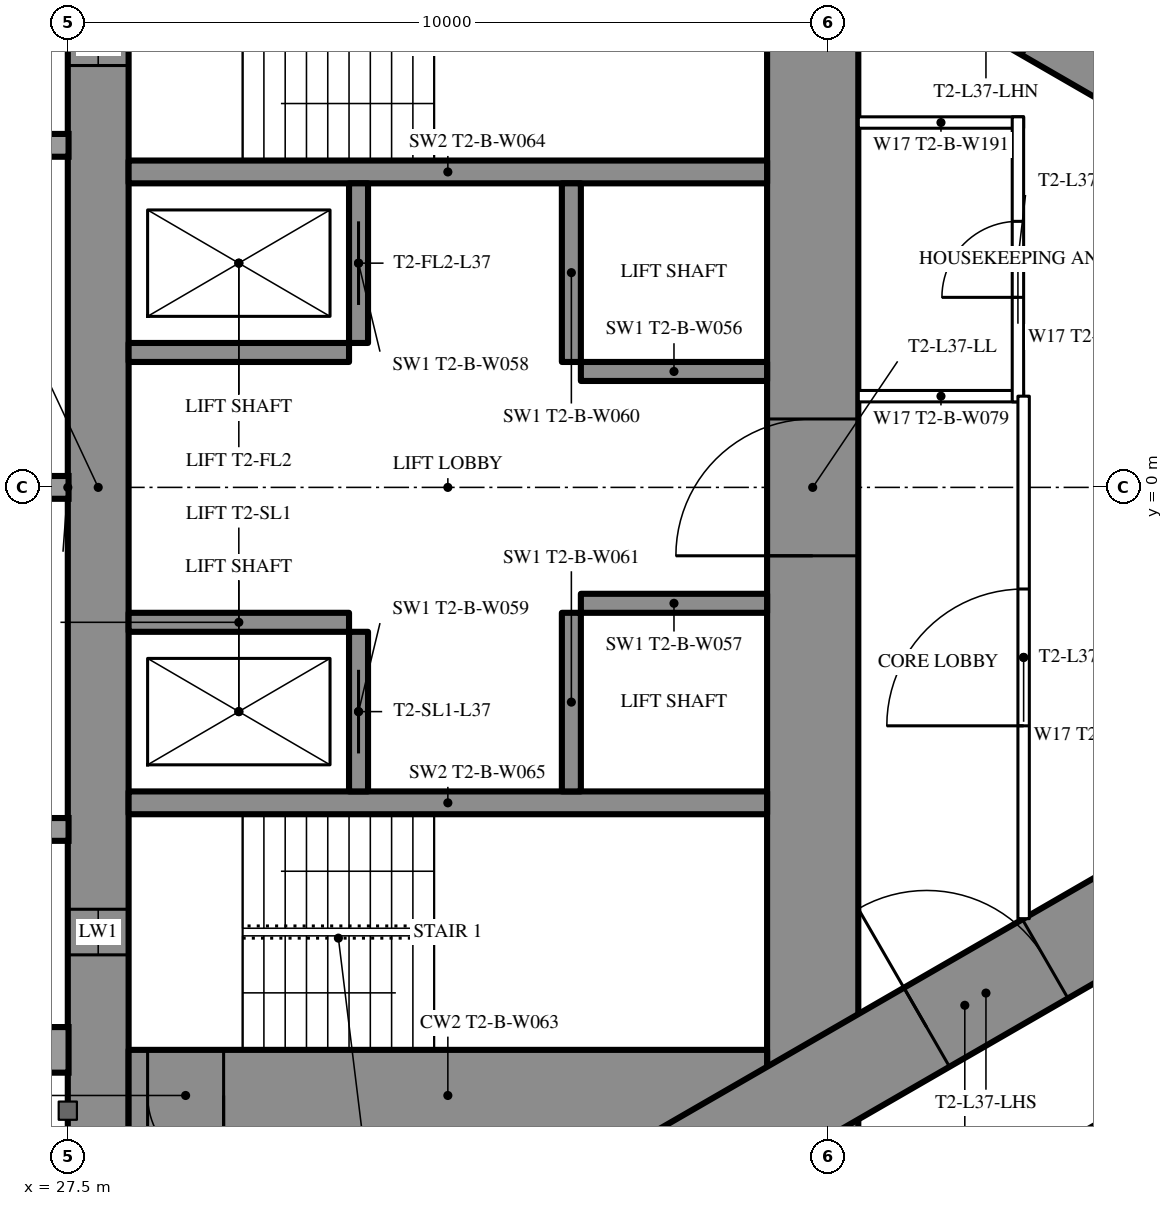
"""IFC4 building model, lengths in metres.
Left out: names, types, materials, properties, quantities, classifications, styles, units other than length and angle.
Written with IfcOpenShell. Run it as: python <this file> out.ifc"""

import sys

from ifc_helpers import new_model, si_unit, direction, frame, frame_2d, origin, place, context, subcontext, project, spatial, rectangle, extrude, element, fill, save


model = new_model("IFC4")
c1 = context("Model", 3, precision=1e-05, world=origin(), true_north=direction((0.0, 1.0)))
c2 = subcontext(c1, "Body", "Model", "MODEL_VIEW")
j1 = project(units=[si_unit("LENGTHUNIT", "METRE"), si_unit("PLANEANGLEUNIT", "RADIAN")], contexts=[c1])
p1 = place(None, origin())
s1 = spatial("IfcSite", under=j1, at=p1, CompositionType="ELEMENT")
p2 = place(p1, origin())
s2 = spatial("IfcBuilding", under=s1, at=p2, CompositionType="ELEMENT")
p3 = place(p2, frame((0.0, 0.0, 139.6)))
s3 = spatial("IfcBuildingStorey", under=s2, at=p3, CompositionType="ELEMENT", Elevation=139.6)
p4 = place(p3, frame((27.9, -8.6, 0.0), z_axis=(0.0, 0.0, 1.0), x_axis=(0.0, 1.0, 0.0)))
e1 = element("IfcWall", 1, at=p4, inside=s3, PredefinedType="SHEAR", context=c2, shape_type="SweptSolid", body=[
    extrude(rectangle(XDim=17.2, YDim=0.8, at=frame_2d((8.6, 0.0))), origin(), (0.0, 0.0, 1.0), 3.5),
])
p5 = place(p4, frame((2.45, 0.0, 0.6)))
e2 = element("IfcOpeningElement", 2, at=p5, cuts=e1, PredefinedType="OPENING", context=c2, shape_type="SweptSolid", body=[
    extrude(rectangle(XDim=0.6, YDim=2.1, at=frame_2d((0.3, 1.05))), frame((0.0, 0.41, 0.0), z_axis=(0.0, -1.0, 0.0), x_axis=(1.0, 0.0, 0.0)), (0.0, 0.0, 1.0), 0.82),
])
p6 = place(p4, frame((14.15, 0.0, 0.6)))
e3 = element("IfcOpeningElement", 3, at=p6, cuts=e1, PredefinedType="OPENING", context=c2, shape_type="SweptSolid", body=[
    extrude(rectangle(XDim=0.6, YDim=2.1, at=frame_2d((0.3, 1.05))), frame((0.0, 0.41, 0.0), z_axis=(0.0, -1.0, 0.0), x_axis=(1.0, 0.0, 0.0)), (0.0, 0.0, 1.0), 0.82),
])
p7 = place(p3, frame((37.3, -8.6, 0.0), z_axis=(0.0, 0.0, 1.0), x_axis=(0.0, 1.0, 0.0)))
e4 = element("IfcWall", 4, at=p7, inside=s3, PredefinedType="SHEAR", context=c2, shape_type="SweptSolid", body=[
    extrude(rectangle(XDim=17.2, YDim=1.2, at=frame_2d((8.6, 0.0))), origin(), (0.0, 0.0, 1.0), 3.5),
])
p8 = place(p7, frame((7.7, 0.0, 0.0)))
e5 = element("IfcOpeningElement", 5, at=p8, cuts=e4, PredefinedType="OPENING", context=c2, shape_type="SweptSolid", body=[
    extrude(rectangle(XDim=1.8, YDim=2.2, at=frame_2d((0.9, 1.1))), frame((0.0, 0.61, 0.0), z_axis=(0.0, -1.0, 0.0), x_axis=(1.0, 0.0, 0.0)), (0.0, 0.0, 1.0), 1.22),
])
p9 = place(p3, frame((28.3, -8.0, 0.0), z_axis=(0.0, 0.0, 1.0), x_axis=(1.0, 0.0, 0.0)))
e6 = element("IfcWall", 6, at=p9, inside=s3, PredefinedType="SHEAR", context=c2, shape_type="SweptSolid", body=[
    extrude(rectangle(XDim=8.4, YDim=1.2, at=frame_2d((4.2, 0.0))), origin(), (0.0, 0.0, 1.0), 3.5),
])
p10 = place(p9, frame((0.25, 0.0, 0.0)))
e7 = element("IfcOpeningElement", 7, at=p10, cuts=e6, PredefinedType="OPENING", context=c2, shape_type="SweptSolid", body=[
    extrude(rectangle(XDim=1.0, YDim=2.2, at=frame_2d((0.5, 1.1))), frame((0.0, 0.61, 0.0), z_axis=(0.0, -1.0, 0.0), x_axis=(1.0, 0.0, 0.0)), (0.0, 0.0, 1.0), 1.22),
])
for number, where, z_axis, x_axis in (
    (8, (28.3, -4.15, 0.0), (0.0, 0.0, 1.0), (1.0, 0.0, 0.0)),
    (9, (28.3, 4.15, 0.0), (0.0, 0.0, 1.0), (1.0, 0.0, 0.0)),
):
    element("IfcWall", number, at=place(p3, frame(where, z_axis=z_axis, x_axis=x_axis)), inside=s3, PredefinedType="SHEAR", context=c2, shape_type="SweptSolid", body=[
        extrude(rectangle(XDim=8.4, YDim=0.3, at=frame_2d((4.2, 0.0))), origin(), (0.0, 0.0, 1.0), 3.5),
    ])
p11 = place(p3, frame((31.325, -4.0, 0.0), z_axis=(0.0, 0.0, 1.0), x_axis=(0.0, 1.0, 0.0)))
e10 = element("IfcWall", 10, at=p11, inside=s3, PredefinedType="SHEAR", context=c2, shape_type="SweptSolid", body=[
    extrude(rectangle(XDim=2.1, YDim=0.25, at=frame_2d((1.05, 0.0))), origin(), (0.0, 0.0, 1.0), 3.5),
])
p12 = place(p11, frame((0.5, 0.0, 0.0)))
e11 = element("IfcOpeningElement", 11, at=p12, cuts=e10, PredefinedType="OPENING", context=c2, shape_type="SweptSolid", body=[
    extrude(rectangle(XDim=1.1, YDim=2.2, at=frame_2d((0.55, 1.1))), frame((0.0, 0.135, 0.0), z_axis=(0.0, -1.0, 0.0), x_axis=(1.0, 0.0, 0.0)), (0.0, 0.0, 1.0), 0.27),
])
p13 = place(p3, frame((34.125, -4.0, 0.0), z_axis=(0.0, 0.0, 1.0), x_axis=(0.0, 1.0, 0.0)))
e12 = element("IfcWall", 12, at=p13, inside=s3, PredefinedType="SHEAR", context=c2, shape_type="SweptSolid", body=[
    extrude(rectangle(XDim=2.35, YDim=0.25, at=frame_2d((1.175, 0.0))), origin(), (0.0, 0.0, 1.0), 3.5),
])
p14 = place(p3, frame((28.3, -1.775, 0.0), z_axis=(0.0, 0.0, 1.0), x_axis=(1.0, 0.0, 0.0)))
e13 = element("IfcWall", 13, at=p14, inside=s3, PredefinedType="SHEAR", context=c2, shape_type="SweptSolid", body=[
    extrude(rectangle(XDim=2.9, YDim=0.25, at=frame_2d((1.45, 0.0))), origin(), (0.0, 0.0, 1.0), 3.5),
])
p15 = place(p3, frame((34.25, -1.525, 0.0), z_axis=(0.0, 0.0, 1.0), x_axis=(1.0, 0.0, 0.0)))
e14 = element("IfcWall", 14, at=p15, inside=s3, PredefinedType="SHEAR", context=c2, shape_type="SweptSolid", body=[
    extrude(rectangle(XDim=2.45, YDim=0.25, at=frame_2d((1.225, 0.0))), origin(), (0.0, 0.0, 1.0), 3.5),
])
p16 = place(p3, frame((31.325, 1.9, 0.0), z_axis=(0.0, 0.0, 1.0), x_axis=(0.0, 1.0, 0.0)))
e15 = element("IfcWall", 15, at=p16, inside=s3, PredefinedType="SHEAR", context=c2, shape_type="SweptSolid", body=[
    extrude(rectangle(XDim=2.1, YDim=0.25, at=frame_2d((1.05, 0.0))), origin(), (0.0, 0.0, 1.0), 3.5),
])
p17 = place(p16, frame((0.5, 0.0, 0.0)))
e16 = element("IfcOpeningElement", 16, at=p17, cuts=e15, PredefinedType="OPENING", context=c2, shape_type="SweptSolid", body=[
    extrude(rectangle(XDim=1.1, YDim=2.2, at=frame_2d((0.55, 1.1))), frame((0.0, 0.135, 0.0), z_axis=(0.0, -1.0, 0.0), x_axis=(1.0, 0.0, 0.0)), (0.0, 0.0, 1.0), 0.27),
])
p18 = place(p3, frame((34.125, 1.65, 0.0), z_axis=(0.0, 0.0, 1.0), x_axis=(0.0, 1.0, 0.0)))
e17 = element("IfcWall", 17, at=p18, inside=s3, PredefinedType="SHEAR", context=c2, shape_type="SweptSolid", body=[
    extrude(rectangle(XDim=2.35, YDim=0.25, at=frame_2d((1.175, 0.0))), origin(), (0.0, 0.0, 1.0), 3.5),
])
p19 = place(p3, frame((28.3, 1.775, 0.0), z_axis=(0.0, 0.0, 1.0), x_axis=(1.0, 0.0, 0.0)))
e18 = element("IfcWall", 18, at=p19, inside=s3, PredefinedType="SHEAR", context=c2, shape_type="SweptSolid", body=[
    extrude(rectangle(XDim=2.9, YDim=0.25, at=frame_2d((1.45, 0.0))), origin(), (0.0, 0.0, 1.0), 3.5),
])
p20 = place(p3, frame((34.25, 1.525, 0.0), z_axis=(0.0, 0.0, 1.0), x_axis=(1.0, 0.0, 0.0)))
e19 = element("IfcWall", 19, at=p20, inside=s3, PredefinedType="SHEAR", context=c2, shape_type="SweptSolid", body=[
    extrude(rectangle(XDim=2.45, YDim=0.25, at=frame_2d((1.225, 0.0))), origin(), (0.0, 0.0, 1.0), 3.5),
])
p21 = place(p3, frame((27.2, -13.8, 0.0), z_axis=(0.0, 0.0, 1.0), x_axis=(0.866027159892, 0.499996958321, 0.0)))
e20 = element("IfcWall", 20, at=p21, inside=s3, PredefinedType="SHEAR", context=c2, shape_type="SweptSolid", body=[
    extrude(rectangle(XDim=27.947, YDim=1.2, at=frame_2d((13.973, 0.0))), origin(), (0.0, 0.0, 1.0), 3.5),
])
p22 = place(p21, frame((4.6, 0.0, 0.0)))
e21 = element("IfcOpeningElement", 21, at=p22, cuts=e20, PredefinedType="OPENING", context=c2, shape_type="SweptSolid", body=[
    extrude(rectangle(XDim=1.0, YDim=2.2, at=frame_2d((0.5, 1.1))), frame((0.0, 0.61, 0.0), z_axis=(0.0, -1.0, 0.0), x_axis=(1.0, 0.0, 0.0)), (0.0, 0.0, 1.0), 1.22),
])
p23 = place(p21, frame((13.395, 0.0, 0.0)))
e22 = element("IfcOpeningElement", 22, at=p23, cuts=e20, PredefinedType="OPENING", context=c2, shape_type="SweptSolid", body=[
    extrude(rectangle(XDim=1.8, YDim=2.2, at=frame_2d((0.9, 1.1))), frame((0.0, 0.61, 0.0), z_axis=(0.0, -1.0, 0.0), x_axis=(1.0, 0.0, 0.0)), (0.0, 0.0, 1.0), 1.22),
])
p24 = place(p3, frame((27.2, 13.8, 0.0), z_axis=(0.0, 0.0, 1.0), x_axis=(0.866024515034, -0.500001539357, 0.0)))
e23 = element("IfcWall", 23, at=p24, inside=s3, PredefinedType="SHEAR", context=c2, shape_type="SweptSolid", body=[
    extrude(rectangle(XDim=26.907, YDim=1.2, at=frame_2d((13.454, 0.0))), origin(), (0.0, 0.0, 1.0), 3.5),
])
p25 = place(p24, frame((4.6, 0.0, 0.0)))
e24 = element("IfcOpeningElement", 24, at=p25, cuts=e23, PredefinedType="OPENING", context=c2, shape_type="SweptSolid", body=[
    extrude(rectangle(XDim=1.0, YDim=2.2, at=frame_2d((0.5, 1.1))), frame((0.0, 0.61, 0.0), z_axis=(0.0, -1.0, 0.0), x_axis=(1.0, 0.0, 0.0)), (0.0, 0.0, 1.0), 1.22),
])
p26 = place(p24, frame((13.395, 0.0, 0.0)))
e25 = element("IfcOpeningElement", 25, at=p26, cuts=e23, PredefinedType="OPENING", context=c2, shape_type="SweptSolid", body=[
    extrude(rectangle(XDim=1.8, YDim=2.2, at=frame_2d((0.9, 1.1))), frame((0.0, 0.61, 0.0), z_axis=(0.0, -1.0, 0.0), x_axis=(1.0, 0.0, 0.0)), (0.0, 0.0, 1.0), 1.22),
])
p27 = place(p3, frame((37.96, -10.243, 0.0), z_axis=(0.0, 0.0, 1.0), x_axis=(0.866026429433, 0.499998223521, 0.0)))
e26 = element("IfcWall", 26, at=p27, inside=s3, PredefinedType="PARTITIONING", context=c2, shape_type="SweptSolid", body=[
    extrude(rectangle(XDim=20.487, YDim=0.2, at=frame_2d((10.243, 0.0))), origin(), (0.0, 0.0, 1.0), 3.25),
])
p28 = place(p27, frame((10.743, 0.0, 0.0)))
e27 = element("IfcOpeningElement", 27, at=p28, cuts=e26, PredefinedType="OPENING", context=c2, shape_type="SweptSolid", body=[
    extrude(rectangle(XDim=0.95, YDim=2.2, at=frame_2d((0.475, 1.1))), frame((0.0, 0.11, 0.0), z_axis=(0.0, -1.0, 0.0), x_axis=(1.0, 0.0, 0.0)), (0.0, 0.0, 1.0), 0.22),
])
p29 = place(p27, frame((17.586, 0.0, 0.0)))
e28 = element("IfcOpeningElement", 28, at=p29, cuts=e26, PredefinedType="OPENING", context=c2, shape_type="SweptSolid", body=[
    extrude(rectangle(XDim=1.8, YDim=2.2, at=frame_2d((0.9, 1.1))), frame((0.0, 0.11, 0.0), z_axis=(0.0, -1.0, 0.0), x_axis=(1.0, 0.0, 0.0)), (0.0, 0.0, 1.0), 0.22),
])
p30 = place(p27, frame((0.6, 0.0, 0.0)))
e29 = element("IfcOpeningElement", 29, at=p30, cuts=e26, PredefinedType="OPENING", context=c2, shape_type="SweptSolid", body=[
    extrude(rectangle(XDim=0.95, YDim=2.2, at=frame_2d((0.475, 1.1))), frame((0.0, 0.11, 0.0), z_axis=(0.0, -1.0, 0.0), x_axis=(1.0, 0.0, 0.0)), (0.0, 0.0, 1.0), 0.22),
])
p31 = place(p3, frame((36.834, 10.894, 0.0), z_axis=(0.0, 0.0, 1.0), x_axis=(0.866028157229, -0.499995230863, 0.0)))
e30 = element("IfcWall", 30, at=p31, inside=s3, PredefinedType="PARTITIONING", context=c2, shape_type="SweptSolid", body=[
    extrude(rectangle(XDim=21.667, YDim=0.2, at=frame_2d((10.833, 0.0))), origin(), (0.0, 0.0, 1.0), 3.25),
])
p32 = place(p31, frame((20.117, 0.0, 0.0)))
e31 = element("IfcOpeningElement", 31, at=p32, cuts=e30, PredefinedType="OPENING", context=c2, shape_type="SweptSolid", body=[
    extrude(rectangle(XDim=0.95, YDim=2.2, at=frame_2d((0.475, 1.1))), frame((0.0, 0.11, 0.0), z_axis=(0.0, -1.0, 0.0), x_axis=(1.0, 0.0, 0.0)), (0.0, 0.0, 1.0), 0.22),
])
p33 = place(p31, frame((14.938, 0.0, 0.0)))
e32 = element("IfcOpeningElement", 32, at=p33, cuts=e30, PredefinedType="OPENING", context=c2, shape_type="SweptSolid", body=[
    extrude(rectangle(XDim=1.8, YDim=2.2, at=frame_2d((0.9, 1.1))), frame((0.0, 0.11, 0.0), z_axis=(0.0, -1.0, 0.0), x_axis=(1.0, 0.0, 0.0)), (0.0, 0.0, 1.0), 0.22),
])
p34 = place(p31, frame((9.99, 0.0, 0.0)))
e33 = element("IfcOpeningElement", 33, at=p34, cuts=e30, PredefinedType="OPENING", context=c2, shape_type="SweptSolid", body=[
    extrude(rectangle(XDim=0.95, YDim=2.2, at=frame_2d((0.475, 1.1))), frame((0.0, 0.11, 0.0), z_axis=(0.0, -1.0, 0.0), x_axis=(1.0, 0.0, 0.0)), (0.0, 0.0, 1.0), 0.22),
])
p35 = place(p31, frame((3.35, 0.0, 0.0)))
e34 = element("IfcOpeningElement", 34, at=p35, cuts=e30, PredefinedType="OPENING", context=c2, shape_type="SweptSolid", body=[
    extrude(rectangle(XDim=1.0, YDim=2.2, at=frame_2d((0.5, 1.1))), frame((0.0, 0.11, 0.0), z_axis=(0.0, -1.0, 0.0), x_axis=(1.0, 0.0, 0.0)), (0.0, 0.0, 1.0), 0.22),
])
for number, where, z_axis, x_axis in (
    (35, (37.9, 1.2, 0.0), (0.0, 0.0, 1.0), (1.0, 0.0, 0.0)),
    (36, (37.9, 4.8, 0.0), (0.0, 0.0, 1.0), (1.0, 0.0, 0.0)),
):
    element("IfcWall", number, at=place(p3, frame(where, z_axis=z_axis, x_axis=x_axis)), inside=s3, PredefinedType="PARTITIONING", context=c2, shape_type="SweptSolid", body=[
        extrude(rectangle(XDim=2.175, YDim=0.15, at=frame_2d((1.087, 0.0))), origin(), (0.0, 0.0, 1.0), 3.25),
    ])
p36 = place(p3, frame((40.0, 1.125, 0.0), z_axis=(0.0, 0.0, 1.0), x_axis=(0.0, 1.0, 0.0)))
e37 = element("IfcWall", 37, at=p36, inside=s3, PredefinedType="PARTITIONING", context=c2, shape_type="SweptSolid", body=[
    extrude(rectangle(XDim=3.75, YDim=0.15, at=frame_2d((1.875, 0.0))), origin(), (0.0, 0.0, 1.0), 3.25),
])
p37 = place(p36, frame((1.375, 0.0, 0.0)))
e38 = element("IfcOpeningElement", 38, at=p37, cuts=e37, PredefinedType="OPENING", context=c2, shape_type="SweptSolid", body=[
    extrude(rectangle(XDim=1.0, YDim=2.2, at=frame_2d((0.5, 1.1))), frame((0.0, 0.085, 0.0), z_axis=(0.0, -1.0, 0.0), x_axis=(1.0, 0.0, 0.0)), (0.0, 0.0, 1.0), 0.17),
])
p38 = place(p3, frame((40.075, -5.674, 0.0), z_axis=(0.0, 0.0, 1.0), x_axis=(0.0, 1.0, 0.0)))
e39 = element("IfcWall", 39, at=p38, inside=s3, PredefinedType="PARTITIONING", context=c2, shape_type="SweptSolid", body=[
    extrude(rectangle(XDim=6.874, YDim=0.15, at=frame_2d((3.437, 0.0))), origin(), (0.0, 0.0, 1.0), 3.25),
])
p39 = place(p38, frame((2.537, 0.0, 0.0)))
e40 = element("IfcOpeningElement", 40, at=p39, cuts=e39, PredefinedType="OPENING", context=c2, shape_type="SweptSolid", body=[
    extrude(rectangle(XDim=1.8, YDim=2.2, at=frame_2d((0.9, 1.1))), frame((0.0, 0.085, 0.0), z_axis=(0.0, -1.0, 0.0), x_axis=(1.0, 0.0, 0.0)), (0.0, 0.0, 1.0), 0.17),
])
p40 = place(p37, origin())
e41 = element("IfcDoor", 41, at=p40, inside=s3, OperationType="SINGLE_SWING_LEFT", PredefinedType="DOOR", context=c2, shape_type="SweptSolid", body=[
    extrude(rectangle(XDim=1.0, YDim=2.2, at=frame_2d((0.5, 1.1))), frame((0.0, 0.025, 0.0), z_axis=(0.0, -1.0, 0.0), x_axis=(1.0, 0.0, 0.0)), (0.0, 0.0, 1.0), 0.05),
])
fill(e38, e41)
p41 = place(p39, origin())
e42 = element("IfcDoor", 42, at=p41, inside=s3, OperationType="DOUBLE_DOOR_SINGLE_SWING", PredefinedType="DOOR", context=c2, shape_type="SweptSolid", body=[
    extrude(rectangle(XDim=1.8, YDim=2.2, at=frame_2d((0.9, 1.1))), frame((0.0, 0.025, 0.0), z_axis=(0.0, -1.0, 0.0), x_axis=(1.0, 0.0, 0.0)), (0.0, 0.0, 1.0), 0.05),
])
fill(e40, e42)
p42 = place(p23, origin())
e43 = element("IfcDoor", 43, at=p42, inside=s3, OperationType="DOUBLE_DOOR_SINGLE_SWING", PredefinedType="DOOR", context=c2, shape_type="SweptSolid", body=[
    extrude(rectangle(XDim=1.8, YDim=2.2, at=frame_2d((0.9, 1.1))), frame((0.0, 0.025, 0.0), z_axis=(0.0, -1.0, 0.0), x_axis=(1.0, 0.0, 0.0)), (0.0, 0.0, 1.0), 0.05),
])
fill(e22, e43)
p43 = place(p8, origin())
e44 = element("IfcDoor", 44, at=p43, inside=s3, OperationType="DOUBLE_DOOR_SINGLE_SWING", PredefinedType="DOOR", context=c2, shape_type="SweptSolid", body=[
    extrude(rectangle(XDim=1.8, YDim=2.2, at=frame_2d((0.9, 1.1))), frame((0.0, 0.025, 0.0), z_axis=(0.0, -1.0, 0.0), x_axis=(1.0, 0.0, 0.0)), (0.0, 0.0, 1.0), 0.05),
])
fill(e5, e44)
p44 = place(p10, origin())
e45 = element("IfcDoor", 45, at=p44, inside=s3, OperationType="SINGLE_SWING_RIGHT", PredefinedType="DOOR", context=c2, shape_type="SweptSolid", body=[
    extrude(rectangle(XDim=1.0, YDim=2.2, at=frame_2d((0.5, 1.1))), frame((0.0, 0.025, 0.0), z_axis=(0.0, -1.0, 0.0), x_axis=(1.0, 0.0, 0.0)), (0.0, 0.0, 1.0), 0.05),
])
fill(e7, e45)
p45 = place(p12, origin())
e46 = element("IfcDoor", 46, at=p45, inside=s3, OperationType="SLIDING_TO_LEFT", PredefinedType="USERDEFINED", context=c2, shape_type="SweptSolid", body=[
    extrude(rectangle(XDim=1.1, YDim=2.2, at=frame_2d((0.55, 1.1))), frame((0.0, 0.025, 0.0), z_axis=(0.0, -1.0, 0.0), x_axis=(1.0, 0.0, 0.0)), (0.0, 0.0, 1.0), 0.05),
])
fill(e11, e46)
p46 = place(p17, origin())
e47 = element("IfcDoor", 47, at=p46, inside=s3, OperationType="SLIDING_TO_LEFT", PredefinedType="USERDEFINED", context=c2, shape_type="SweptSolid", body=[
    extrude(rectangle(XDim=1.1, YDim=2.2, at=frame_2d((0.55, 1.1))), frame((0.0, 0.025, 0.0), z_axis=(0.0, -1.0, 0.0), x_axis=(1.0, 0.0, 0.0)), (0.0, 0.0, 1.0), 0.05),
])
fill(e16, e47)
p47 = place(p5, origin())
e48 = element("IfcWindow", 48, at=p47, inside=s3, PartitioningType="SINGLE_PANEL", PredefinedType="WINDOW", context=c2, shape_type="SweptSolid", body=[
    extrude(rectangle(XDim=0.6, YDim=2.1, at=frame_2d((0.3, 1.05))), frame((0.0, 0.03, 0.0), z_axis=(0.0, -1.0, 0.0), x_axis=(1.0, 0.0, 0.0)), (0.0, 0.0, 1.0), 0.06),
])
fill(e2, e48)
p48 = place(p6, origin())
e49 = element("IfcWindow", 49, at=p48, inside=s3, PartitioningType="SINGLE_PANEL", PredefinedType="WINDOW", context=c2, shape_type="SweptSolid", body=[
    extrude(rectangle(XDim=0.6, YDim=2.1, at=frame_2d((0.3, 1.05))), frame((0.0, 0.03, 0.0), z_axis=(0.0, -1.0, 0.0), x_axis=(1.0, 0.0, 0.0)), (0.0, 0.0, 1.0), 0.06),
])
fill(e3, e49)
save(model, sys.argv[1])
